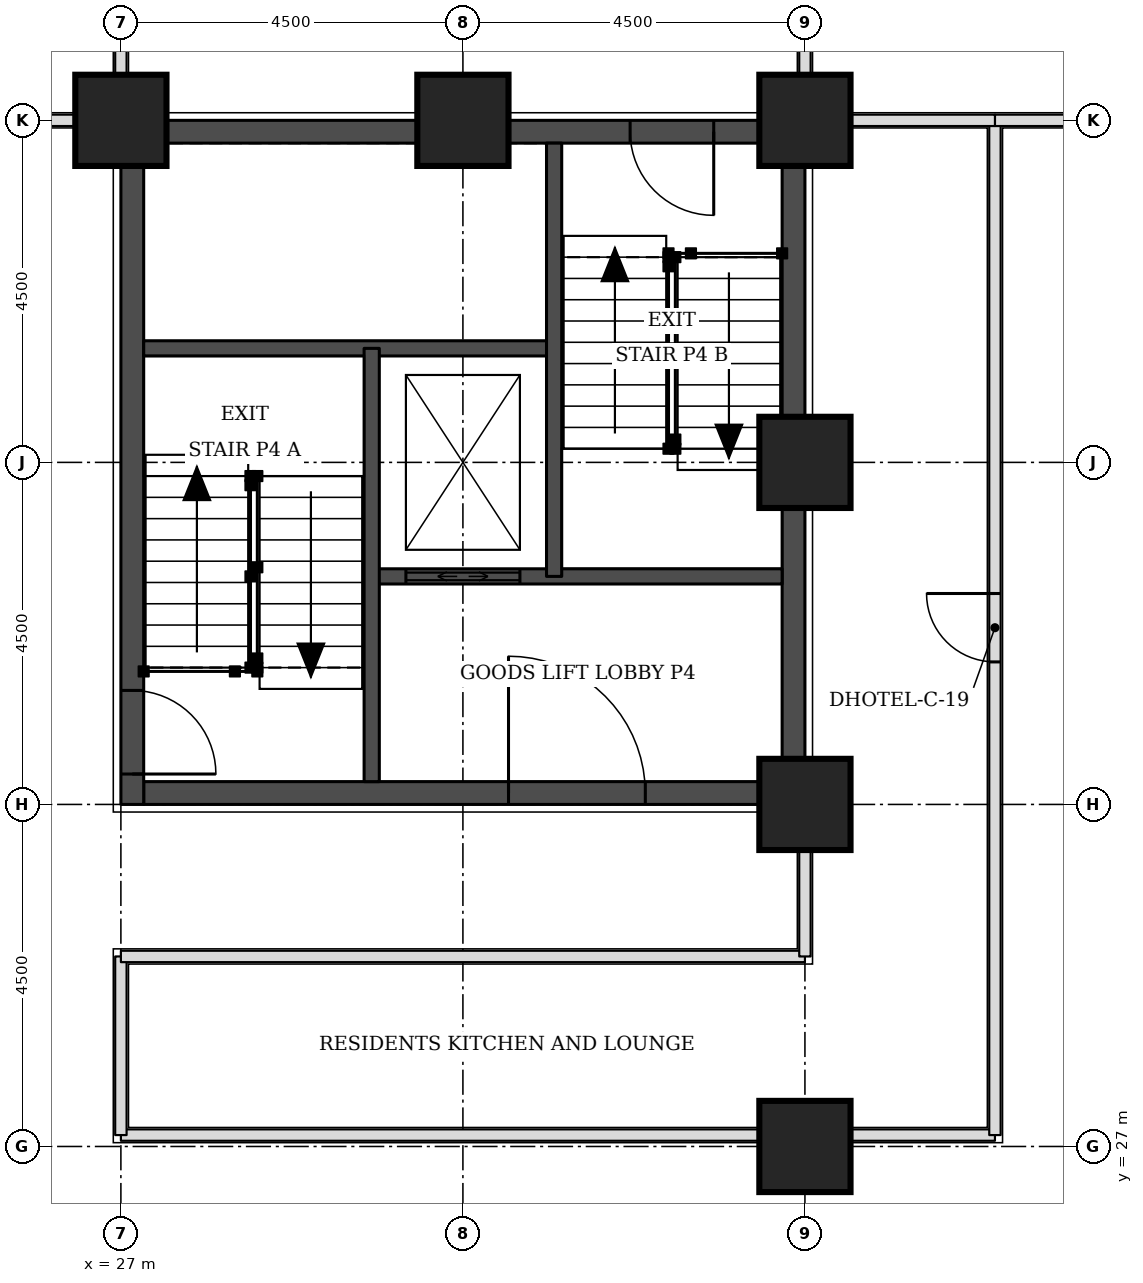
"""IFC4 building model, lengths in metres.
Left out: names, types, materials, properties, quantities, classifications, styles, units other than length and angle.
Written with IfcOpenShell. Run it as: python <this file> out.ifc"""

import sys

from ifc_helpers import new_model, si_unit, direction, frame, frame_2d, origin, origin_2d, place, context, subcontext, project, spatial, rectangle, extrude, element, fill, save


model = new_model("IFC4")
c1 = context("Model", 3, precision=1e-05, world=origin(), true_north=direction((0.0, 1.0)))
c2 = subcontext(c1, "Body", "Model", "MODEL_VIEW")
j1 = project(units=[si_unit("LENGTHUNIT", "METRE"), si_unit("PLANEANGLEUNIT", "RADIAN")], contexts=[c1])
p1 = place(None, origin())
s1 = spatial("IfcSite", under=j1, at=p1, CompositionType="ELEMENT")
p2 = place(p1, origin())
s2 = spatial("IfcBuilding", under=s1, at=p2, CompositionType="ELEMENT")
p3 = place(p2, frame((0.0, 0.0, 33.0)))
s3 = spatial("IfcBuildingStorey", under=s2, at=p3, CompositionType="ELEMENT", Elevation=33.0)
for number, where, z_axis, x_axis in (
    (1, (36.0, 27.0, 0.0), (0.0, 0.0, 1.0), (1.0, 0.0, 0.0)),
    (2, (36.0, 31.5, 0.0), (0.0, 0.0, 1.0), (1.0, 0.0, 0.0)),
    (3, (36.0, 36.0, 0.0), (0.0, 0.0, 1.0), (1.0, 0.0, 0.0)),
    (4, (27.0, 40.5, 0.0), (0.0, 0.0, 1.0), (1.0, 0.0, 0.0)),
    (5, (31.5, 40.5, 0.0), (0.0, 0.0, 1.0), (1.0, 0.0, 0.0)),
    (6, (36.0, 40.5, 0.0), (0.0, 0.0, 1.0), (1.0, 0.0, 0.0)),
):
    element("IfcColumn", number, at=place(p3, frame(where, z_axis=z_axis, x_axis=x_axis)), inside=s3, PredefinedType="COLUMN", context=c2, shape_type="SweptSolid", body=[
        extrude(rectangle(XDim=1.2, YDim=1.2, at=origin_2d()), origin(), (0.0, 0.0, 1.0), 3.3),
    ])
p4 = place(p3, frame((27.3, 31.65, 0.0), z_axis=(0.0, 0.0, 1.0), x_axis=(1.0, 0.0, 0.0)))
e7 = element("IfcWall", 7, at=p4, inside=s3, PredefinedType="SHEAR", context=c2, shape_type="SweptSolid", body=[
    extrude(rectangle(XDim=8.4, YDim=0.3, at=frame_2d((4.2, 0.0))), origin(), (0.0, 0.0, 1.0), 3.3),
])
p5 = place(p4, frame((4.8, 0.0, 0.0)))
e8 = element("IfcOpeningElement", 8, at=p5, cuts=e7, PredefinedType="OPENING", context=c2, shape_type="SweptSolid", body=[
    extrude(rectangle(XDim=1.8, YDim=2.1, at=frame_2d((0.9, 1.05))), frame((0.0, 0.16, 0.0), z_axis=(0.0, -1.0, 0.0), x_axis=(1.0, 0.0, 0.0)), (0.0, 0.0, 1.0), 0.32),
])
p6 = place(p3, frame((27.3, 40.35, 0.0), z_axis=(0.0, 0.0, 1.0), x_axis=(1.0, 0.0, 0.0)))
e9 = element("IfcWall", 9, at=p6, inside=s3, PredefinedType="SHEAR", context=c2, shape_type="SweptSolid", body=[
    extrude(rectangle(XDim=8.4, YDim=0.3, at=frame_2d((4.2, 0.0))), origin(), (0.0, 0.0, 1.0), 3.3),
])
p7 = place(p6, frame((6.4, 0.0, 0.0)))
e10 = element("IfcOpeningElement", 10, at=p7, cuts=e9, PredefinedType="OPENING", context=c2, shape_type="SweptSolid", body=[
    extrude(rectangle(XDim=1.1, YDim=2.1, at=frame_2d((0.55, 1.05))), frame((0.0, 0.16, 0.0), z_axis=(0.0, -1.0, 0.0), x_axis=(1.0, 0.0, 0.0)), (0.0, 0.0, 1.0), 0.32),
])
p8 = place(p3, frame((27.15, 31.5, 0.0), z_axis=(0.0, 0.0, 1.0), x_axis=(0.0, 1.0, 0.0)))
e11 = element("IfcWall", 11, at=p8, inside=s3, PredefinedType="SHEAR", context=c2, shape_type="SweptSolid", body=[
    extrude(rectangle(XDim=9.0, YDim=0.3, at=frame_2d((4.5, 0.0))), origin(), (0.0, 0.0, 1.0), 3.3),
])
p9 = place(p8, frame((0.4, 0.0, 0.0)))
e12 = element("IfcOpeningElement", 12, at=p9, cuts=e11, PredefinedType="OPENING", context=c2, shape_type="SweptSolid", body=[
    extrude(rectangle(XDim=1.1, YDim=2.1, at=frame_2d((0.55, 1.05))), frame((0.0, 0.16, 0.0), z_axis=(0.0, -1.0, 0.0), x_axis=(1.0, 0.0, 0.0)), (0.0, 0.0, 1.0), 0.32),
])
p10 = place(p3, frame((35.85, 31.5, 0.0), z_axis=(0.0, 0.0, 1.0), x_axis=(0.0, 1.0, 0.0)))
e13 = element("IfcWall", 13, at=p10, inside=s3, PredefinedType="SHEAR", context=c2, shape_type="SweptSolid", body=[
    extrude(rectangle(XDim=9.0, YDim=0.3, at=frame_2d((4.5, 0.0))), origin(), (0.0, 0.0, 1.0), 3.3),
])
p11 = place(p3, frame((27.0, 27.15, 0.0), z_axis=(0.0, 0.0, 1.0), x_axis=(1.0, 0.0, 0.0)))
e14 = element("IfcWall", 14, at=p11, inside=s3, PredefinedType="PARTITIONING", context=c2, shape_type="SweptSolid", body=[
    extrude(rectangle(XDim=11.5, YDim=0.15, at=frame_2d((5.75, 0.0))), origin(), (0.0, 0.0, 1.0), 3.08),
])
p12 = place(p3, frame((27.0, 27.15, 0.0), z_axis=(0.0, 0.0, 1.0), x_axis=(0.0, 1.0, 0.0)))
e15 = element("IfcWall", 15, at=p12, inside=s3, PredefinedType="PARTITIONING", context=c2, shape_type="SweptSolid", body=[
    extrude(rectangle(XDim=2.35, YDim=0.15, at=frame_2d((1.175, 0.0))), origin(), (0.0, 0.0, 1.0), 3.08),
])
p13 = place(p3, frame((38.5, 27.15, 0.0), z_axis=(0.0, 0.0, 1.0), x_axis=(0.0, 1.0, 0.0)))
e16 = element("IfcWall", 16, at=p13, inside=s3, PredefinedType="PARTITIONING", context=c2, shape_type="SweptSolid", body=[
    extrude(rectangle(XDim=13.35, YDim=0.15, at=frame_2d((6.675, 0.0))), origin(), (0.0, 0.0, 1.0), 3.08),
])
p14 = place(p13, frame((6.225, 0.0, 0.0)))
e17 = element("IfcOpeningElement", 17, at=p14, cuts=e16, PredefinedType="OPENING", context=c2, shape_type="SweptSolid", body=[
    extrude(rectangle(XDim=0.9, YDim=2.1, at=frame_2d((0.45, 1.05))), frame((0.0, 0.085, 0.0), z_axis=(0.0, -1.0, 0.0), x_axis=(1.0, 0.0, 0.0)), (0.0, 0.0, 1.0), 0.17),
])
p15 = place(p3, frame((27.0, 29.5, 0.0), z_axis=(0.0, 0.0, 1.0), x_axis=(1.0, 0.0, 0.0)))
e18 = element("IfcWall", 18, at=p15, inside=s3, PredefinedType="PARTITIONING", context=c2, shape_type="SweptSolid", body=[
    extrude(rectangle(XDim=9.0, YDim=0.15, at=frame_2d((4.5, 0.0))), origin(), (0.0, 0.0, 1.0), 3.08),
])
p16 = place(p3, frame((36.0, 29.5, 0.0), z_axis=(0.0, 0.0, 1.0), x_axis=(0.0, 1.0, 0.0)))
e19 = element("IfcWall", 19, at=p16, inside=s3, PredefinedType="PARTITIONING", context=c2, shape_type="SweptSolid", body=[
    extrude(rectangle(XDim=1.95, YDim=0.15, at=frame_2d((0.975, 0.0))), origin(), (0.0, 0.0, 1.0), 2.33),
])
p17 = place(p3, frame((24.6, 40.5, 0.0), z_axis=(0.0, 0.0, 1.0), x_axis=(1.0, 0.0, 0.0)))
e20 = element("IfcWall", 20, at=p17, inside=s3, PredefinedType="PARTITIONING", context=c2, shape_type="SweptSolid", body=[
    extrude(rectangle(XDim=2.35, YDim=0.15, at=frame_2d((1.175, 0.0))), origin(), (0.0, 0.0, 1.0), 2.33),
])
p18 = place(p3, frame((38.5, 40.5, 0.0), z_axis=(0.0, 0.0, 1.0), x_axis=(1.0, 0.0, 0.0)))
e21 = element("IfcWall", 21, at=p18, inside=s3, PredefinedType="PARTITIONING", context=c2, shape_type="SweptSolid", body=[
    extrude(rectangle(XDim=1.95, YDim=0.15, at=frame_2d((0.975, 0.0))), origin(), (0.0, 0.0, 1.0), 2.33),
])
p19 = place(p3, frame((27.0, 40.55, 0.0), z_axis=(0.0, 0.0, 1.0), x_axis=(0.0, 1.0, 0.0)))
e22 = element("IfcWall", 22, at=p19, inside=s3, PredefinedType="PARTITIONING", context=c2, shape_type="SweptSolid", body=[
    extrude(rectangle(XDim=2.45, YDim=0.15, at=frame_2d((1.225, 0.0))), origin(), (0.0, 0.0, 1.0), 3.08),
])
p20 = place(p3, frame((36.0, 40.55, 0.0), z_axis=(0.0, 0.0, 1.0), x_axis=(0.0, 1.0, 0.0)))
e23 = element("IfcWall", 23, at=p20, inside=s3, PredefinedType="PARTITIONING", context=c2, shape_type="SweptSolid", body=[
    extrude(rectangle(XDim=4.4, YDim=0.15, at=frame_2d((2.2, 0.0))), origin(), (0.0, 0.0, 1.0), 2.33),
])
p21 = place(p3, frame((36.05, 40.5, 0.0), z_axis=(0.0, 0.0, 1.0), x_axis=(1.0, 0.0, 0.0)))
e24 = element("IfcWall", 24, at=p21, inside=s3, PredefinedType="PARTITIONING", context=c2, shape_type="SweptSolid", body=[
    extrude(rectangle(XDim=2.45, YDim=0.15, at=frame_2d((1.225, 0.0))), origin(), (0.0, 0.0, 1.0), 2.33),
])
p22 = place(p3, frame((30.3, 34.5, 0.0), z_axis=(0.0, 0.0, 1.0), x_axis=(1.0, 0.0, 0.0)))
e25 = element("IfcWall", 25, at=p22, inside=s3, PredefinedType="SOLIDWALL", context=c2, shape_type="SweptSolid", body=[
    extrude(rectangle(XDim=5.4, YDim=0.2, at=frame_2d((2.7, 0.0))), origin(), (0.0, 0.0, 1.0), 3.08),
])
p23 = place(p22, frame((0.45, 0.0, 0.0)))
e26 = element("IfcOpeningElement", 26, at=p23, cuts=e25, PredefinedType="OPENING", context=c2, shape_type="SweptSolid", body=[
    extrude(rectangle(XDim=1.5, YDim=2.1, at=frame_2d((0.75, 1.05))), frame((0.0, 0.11, 0.0), z_axis=(0.0, -1.0, 0.0), x_axis=(1.0, 0.0, 0.0)), (0.0, 0.0, 1.0), 0.22),
])
p24 = place(p3, frame((27.3, 37.5, 0.0), z_axis=(0.0, 0.0, 1.0), x_axis=(1.0, 0.0, 0.0)))
e27 = element("IfcWall", 27, at=p24, inside=s3, PredefinedType="SOLIDWALL", context=c2, shape_type="SweptSolid", body=[
    extrude(rectangle(XDim=5.4, YDim=0.2, at=frame_2d((2.7, 0.0))), origin(), (0.0, 0.0, 1.0), 3.08),
])
for number, where, z_axis, x_axis in (
    (28, (30.3, 31.8, 0.0), (0.0, 0.0, 1.0), (0.0, 1.0, 0.0)),
    (29, (32.7, 34.5, 0.0), (0.0, 0.0, 1.0), (0.0, 1.0, 0.0)),
):
    element("IfcWall", number, at=place(p3, frame(where, z_axis=z_axis, x_axis=x_axis)), inside=s3, PredefinedType="SOLIDWALL", context=c2, shape_type="SweptSolid", body=[
        extrude(rectangle(XDim=5.7, YDim=0.2, at=frame_2d((2.85, 0.0))), origin(), (0.0, 0.0, 1.0), 3.08),
    ])
p25 = place(p14, origin())
e30 = element("IfcDoor", 30, at=p25, inside=s3, OperationType="SINGLE_SWING_RIGHT", PredefinedType="DOOR", context=c2, shape_type="SweptSolid", body=[
    extrude(rectangle(XDim=0.9, YDim=2.1, at=frame_2d((0.45, 1.05))), frame((0.0, 0.025, 0.0), z_axis=(0.0, -1.0, 0.0), x_axis=(1.0, 0.0, 0.0)), (0.0, 0.0, 1.0), 0.05),
])
fill(e17, e30)
p26 = place(p9, frame((1.1, 0.0, 0.0), z_axis=(0.0, 0.0, 1.0), x_axis=(-1.0, 0.0, 0.0)))
e31 = element("IfcDoor", 31, at=p26, inside=s3, OperationType="SINGLE_SWING_RIGHT", PredefinedType="DOOR", context=c2, shape_type="SweptSolid", body=[
    extrude(rectangle(XDim=1.1, YDim=2.1, at=frame_2d((0.55, 1.05))), frame((0.0, 0.025, 0.0), z_axis=(0.0, -1.0, 0.0), x_axis=(1.0, 0.0, 0.0)), (0.0, 0.0, 1.0), 0.05),
])
fill(e12, e31)
p27 = place(p7, frame((1.1, 0.0, 0.0), z_axis=(0.0, 0.0, 1.0), x_axis=(-1.0, 0.0, 0.0)))
e32 = element("IfcDoor", 32, at=p27, inside=s3, OperationType="SINGLE_SWING_LEFT", PredefinedType="DOOR", context=c2, shape_type="SweptSolid", body=[
    extrude(rectangle(XDim=1.1, YDim=2.1, at=frame_2d((0.55, 1.05))), frame((0.0, 0.025, 0.0), z_axis=(0.0, -1.0, 0.0), x_axis=(1.0, 0.0, 0.0)), (0.0, 0.0, 1.0), 0.05),
])
fill(e10, e32)
p28 = place(p23, origin())
e33 = element("IfcDoor", 33, at=p28, inside=s3, OperationType="DOUBLE_DOOR_SLIDING", PredefinedType="DOOR", context=c2, shape_type="SweptSolid", body=[
    extrude(rectangle(XDim=1.5, YDim=2.1, at=frame_2d((0.75, 1.05))), frame((0.0, 0.025, 0.0), z_axis=(0.0, -1.0, 0.0), x_axis=(1.0, 0.0, 0.0)), (0.0, 0.0, 1.0), 0.05),
])
fill(e26, e33)
p29 = place(p5, origin())
e34 = element("IfcDoor", 34, at=p29, inside=s3, OperationType="SINGLE_SWING_LEFT", PredefinedType="DOOR", context=c2, shape_type="SweptSolid", body=[
    extrude(rectangle(XDim=1.8, YDim=2.1, at=frame_2d((0.9, 1.05))), frame((0.0, 0.025, 0.0), z_axis=(0.0, -1.0, 0.0), x_axis=(1.0, 0.0, 0.0)), (0.0, 0.0, 1.0), 0.05),
])
fill(e8, e34)
save(model, sys.argv[1])
